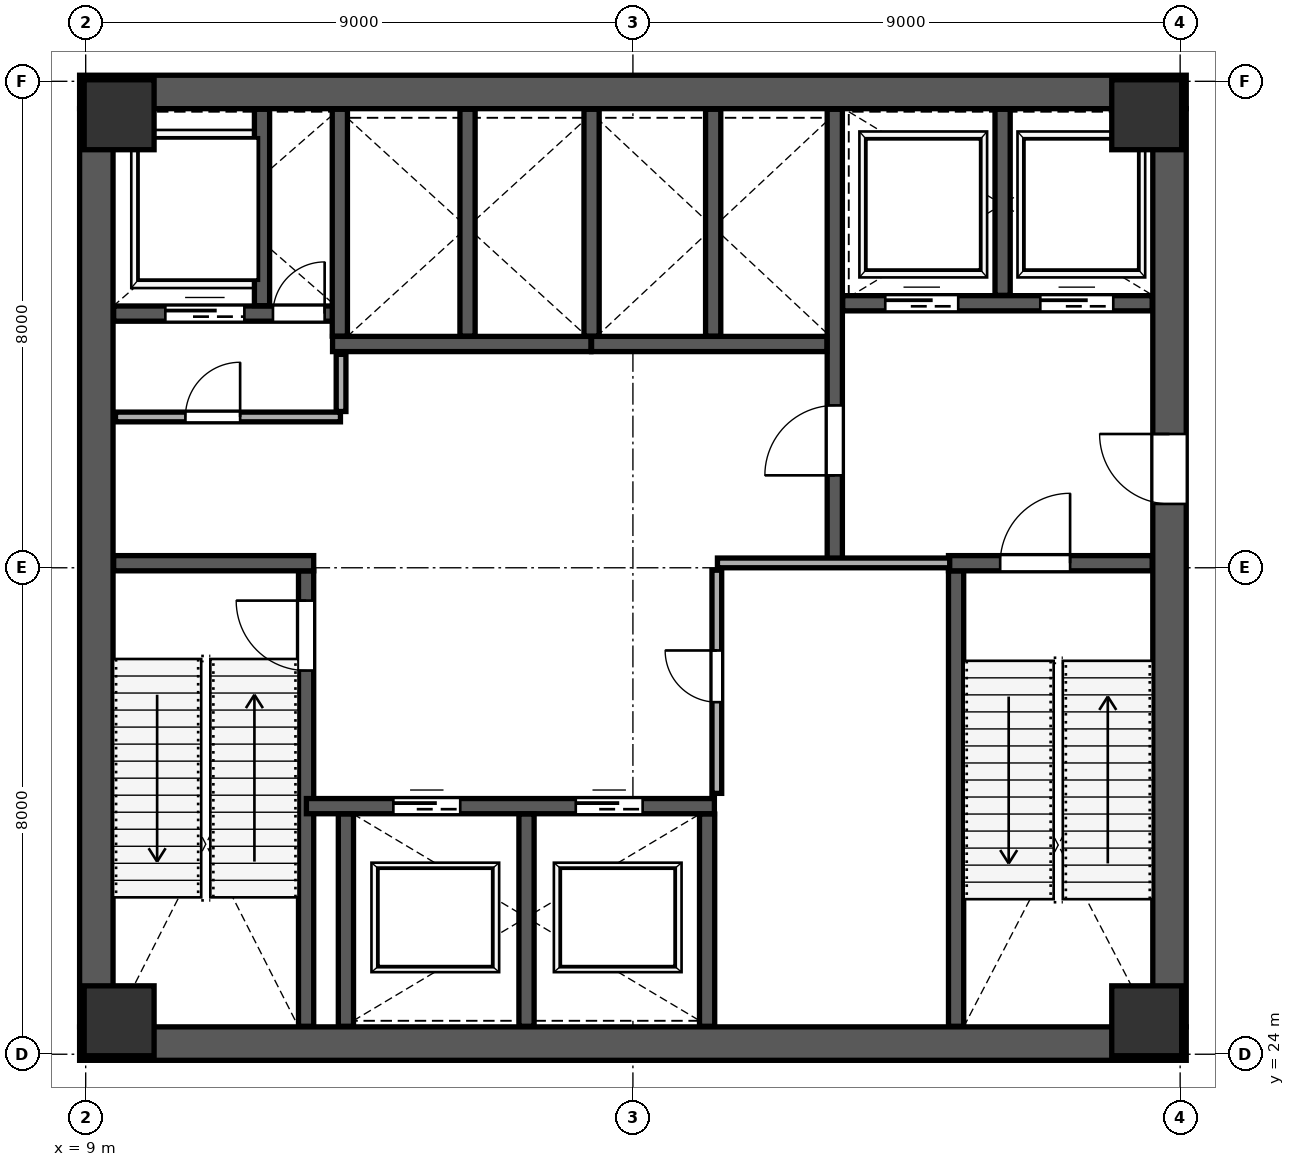
"""IFC4 building model, lengths in metres.
Left out: names, types, materials, properties, quantities, classifications, styles, units other than length and angle.
Written with IfcOpenShell. Run it as: python <this file> out.ifc"""

import sys

from ifc_helpers import new_model, si_unit, direction, frame, frame_2d, origin, origin_2d, place, context, subcontext, project, spatial, rectangle, extrude, source, transform, mapped, element, fill, save


model = new_model("IFC4")
c1 = context("Model", 3, precision=1e-05, world=origin(), true_north=direction((0.0, 1.0)))
c2 = subcontext(c1, "Body", "Model", "MODEL_VIEW")
j1 = project(units=[si_unit("LENGTHUNIT", "METRE"), si_unit("PLANEANGLEUNIT", "RADIAN")], contexts=[c1])
p1 = place(None, origin())
s1 = spatial("IfcSite", under=j1, at=p1, CompositionType="ELEMENT")
p2 = place(p1, origin())
s2 = spatial("IfcBuilding", under=s1, at=p2, CompositionType="ELEMENT")
p3 = place(p2, frame((0.0, 0.0, 116.8)))
s3 = spatial("IfcBuildingStorey", under=s2, at=p3, CompositionType="ELEMENT", Elevation=116.8)
m1 = source(origin(), c2, "Body", "SweptSolid", [
    extrude(rectangle(XDim=1.15, YDim=1.15, at=origin_2d()), origin(), (0.0, 0.0, 1.0), 5.398),
])
for number, where, z_axis, x_axis in (
    (1, (9.55, 24.55, 0.001), (0.0, 0.0, 1.0), (1.0, 0.0, 0.0)),
    (2, (26.45, 24.55, 0.001), (0.0, 0.0, 1.0), (1.0, 0.0, 0.0)),
    (3, (9.55, 39.45, 0.001), (0.0, 0.0, 1.0), (1.0, 0.0, 0.0)),
    (4, (26.45, 39.45, 0.001), (0.0, 0.0, 1.0), (1.0, 0.0, 0.0)),
):
    element("IfcColumn", number, at=place(p3, frame(where, z_axis=z_axis, x_axis=x_axis)), inside=s3, PredefinedType="COLUMN", context=c2, shape_type="MappedRepresentation", body=[
        mapped(m1, transform((0.0, 0.0, 0.0), scale=1.0)),
    ])
p4 = place(p3, frame((9.175, 24.45, 0.0), z_axis=(0.0, 0.0, 1.0), x_axis=(0.0, 1.0, 0.0)))
e5 = element("IfcWall", 5, at=p4, inside=s3, PredefinedType="SHEAR", context=c2, shape_type="SweptSolid", body=[
    extrude(rectangle(XDim=15.1, YDim=0.55, at=frame_2d((7.55, 0.0))), origin(), (0.0, 0.0, 1.0), 5.12),
])
p5 = place(p3, frame((26.825, 24.45, 0.0), z_axis=(0.0, 0.0, 1.0), x_axis=(0.0, 1.0, 0.0)))
e6 = element("IfcWall", 6, at=p5, inside=s3, PredefinedType="SHEAR", context=c2, shape_type="SweptSolid", body=[
    extrude(rectangle(XDim=15.1, YDim=0.55, at=frame_2d((7.55, 0.0))), origin(), (0.0, 0.0, 1.0), 5.12),
])
p6 = place(p5, frame((8.6, 0.0, 0.0)))
e7 = element("IfcOpeningElement", 7, at=p6, cuts=e6, PredefinedType="OPENING", context=c2, shape_type="SweptSolid", body=[
    extrude(rectangle(XDim=1.15, YDim=2.2, at=frame_2d((0.575, 1.1))), frame((0.0, 0.285, 0.0), z_axis=(0.0, -1.0, 0.0), x_axis=(1.0, 0.0, 0.0)), (0.0, 0.0, 1.0), 0.57),
])
for number, where, z_axis, x_axis in (
    (8, (8.9, 24.175, 0.0), (0.0, 0.0, 1.0), (1.0, 0.0, 0.0)),
    (9, (8.9, 39.825, 0.0), (0.0, 0.0, 1.0), (1.0, 0.0, 0.0)),
):
    element("IfcWall", number, at=place(p3, frame(where, z_axis=z_axis, x_axis=x_axis)), inside=s3, PredefinedType="SHEAR", context=c2, shape_type="SweptSolid", body=[
        extrude(rectangle(XDim=18.2, YDim=0.55, at=frame_2d((9.1, 0.0))), origin(), (0.0, 0.0, 1.0), 5.12),
    ])
p7 = place(p3, frame((12.625, 24.46, 0.0), z_axis=(0.0, 0.0, 1.0), x_axis=(0.0, 1.0, 0.0)))
e10 = element("IfcWall", 10, at=p7, inside=s3, PredefinedType="SHEAR", context=c2, shape_type="SweptSolid", body=[
    extrude(rectangle(XDim=7.49, YDim=0.25, at=frame_2d((3.745, 0.0))), origin(), (0.0, 0.0, 1.0), 5.12),
])
p8 = place(p7, frame((5.85, 0.0, 0.0)))
e11 = element("IfcOpeningElement", 11, at=p8, cuts=e10, PredefinedType="OPENING", context=c2, shape_type="SweptSolid", body=[
    extrude(rectangle(XDim=1.15, YDim=2.2, at=frame_2d((0.575, 1.1))), frame((0.0, 0.135, 0.0), z_axis=(0.0, -1.0, 0.0), x_axis=(1.0, 0.0, 0.0)), (0.0, 0.0, 1.0), 0.27),
])
p9 = place(p3, frame((9.46, 32.075, 0.0), z_axis=(0.0, 0.0, 1.0), x_axis=(1.0, 0.0, 0.0)))
e12 = element("IfcWall", 12, at=p9, inside=s3, PredefinedType="SHEAR", context=c2, shape_type="SweptSolid", body=[
    extrude(rectangle(XDim=3.29, YDim=0.25, at=frame_2d((1.645, 0.0))), origin(), (0.0, 0.0, 1.0), 5.12),
])
p10 = place(p3, frame((23.315, 24.46, 0.0), z_axis=(0.0, 0.0, 1.0), x_axis=(0.0, 1.0, 0.0)))
e13 = element("IfcWall", 13, at=p10, inside=s3, PredefinedType="SHEAR", context=c2, shape_type="SweptSolid", body=[
    extrude(rectangle(XDim=7.49, YDim=0.25, at=frame_2d((3.745, 0.0))), origin(), (0.0, 0.0, 1.0), 5.12),
])
p11 = place(p3, frame((23.19, 32.075, 0.0), z_axis=(0.0, 0.0, 1.0), x_axis=(1.0, 0.0, 0.0)))
e14 = element("IfcWall", 14, at=p11, inside=s3, PredefinedType="SHEAR", context=c2, shape_type="SweptSolid", body=[
    extrude(rectangle(XDim=3.35, YDim=0.25, at=frame_2d((1.675, 0.0))), origin(), (0.0, 0.0, 1.0), 5.12),
])
p12 = place(p11, frame((0.85, 0.0, 0.0)))
e15 = element("IfcOpeningElement", 15, at=p12, cuts=e14, PredefinedType="OPENING", context=c2, shape_type="SweptSolid", body=[
    extrude(rectangle(XDim=1.15, YDim=2.2, at=frame_2d((0.575, 1.1))), frame((0.0, 0.135, 0.0), z_axis=(0.0, -1.0, 0.0), x_axis=(1.0, 0.0, 0.0)), (0.0, 0.0, 1.0), 0.27),
])
p13 = place(p3, frame((21.32, 32.12, 0.0), z_axis=(0.0, 0.0, 1.0), x_axis=(0.0, 1.0, 0.0)))
e16 = element("IfcWall", 16, at=p13, inside=s3, PredefinedType="SHEAR", context=c2, shape_type="SweptSolid", body=[
    extrude(rectangle(XDim=7.42, YDim=0.25, at=frame_2d((3.71, 0.0))), origin(), (0.0, 0.0, 1.0), 5.12),
])
p14 = place(p13, frame((1.4, 0.0, 0.0)))
e17 = element("IfcOpeningElement", 17, at=p14, cuts=e16, PredefinedType="OPENING", context=c2, shape_type="SweptSolid", body=[
    extrude(rectangle(XDim=1.15, YDim=2.2, at=frame_2d((0.575, 1.1))), frame((0.0, 0.135, 0.0), z_axis=(0.0, -1.0, 0.0), x_axis=(1.0, 0.0, 0.0)), (0.0, 0.0, 1.0), 0.27),
])
p15 = place(p3, frame((9.46, 36.18, 0.0), z_axis=(0.0, 0.0, 1.0), x_axis=(1.0, 0.0, 0.0)))
e18 = element("IfcWall", 18, at=p15, inside=s3, PredefinedType="SHEAR", context=c2, shape_type="SweptSolid", body=[
    extrude(rectangle(XDim=3.79, YDim=0.25, at=frame_2d((1.895, 0.0))), origin(), (0.0, 0.0, 1.0), 5.12),
])
p16 = place(p15, frame((2.62, 0.0, 0.0)))
e19 = element("IfcOpeningElement", 19, at=p16, cuts=e18, PredefinedType="OPENING", context=c2, shape_type="SweptSolid", body=[
    extrude(rectangle(XDim=0.85, YDim=2.1, at=frame_2d((0.425, 1.05))), frame((0.0, 0.135, 0.0), z_axis=(0.0, -1.0, 0.0), x_axis=(1.0, 0.0, 0.0)), (0.0, 0.0, 1.0), 0.27),
])
p17 = place(p15, frame((0.85, 0.0, 0.0)))
e20 = element("IfcOpeningElement", 20, at=p17, cuts=e18, PredefinedType="OPENING", context=c2, shape_type="SweptSolid", body=[
    extrude(rectangle(XDim=1.3, YDim=2.25, at=frame_2d((0.65, 1.125))), frame((0.0, 0.135, 0.0), z_axis=(0.0, -1.0, 0.0), x_axis=(1.0, 0.0, 0.0)), (0.0, 0.0, 1.0), 0.27),
])
p18 = place(p3, frame((11.9, 36.31, 0.0), z_axis=(0.0, 0.0, 1.0), x_axis=(0.0, 1.0, 0.0)))
e21 = element("IfcWall", 21, at=p18, inside=s3, PredefinedType="SHEAR", context=c2, shape_type="SweptSolid", body=[
    extrude(rectangle(XDim=3.23, YDim=0.25, at=frame_2d((1.615, 0.0))), origin(), (0.0, 0.0, 1.0), 5.12),
])
p19 = place(p3, frame((21.45, 36.35, 0.0), z_axis=(0.0, 0.0, 1.0), x_axis=(1.0, 0.0, 0.0)))
e22 = element("IfcWall", 22, at=p19, inside=s3, PredefinedType="SHEAR", context=c2, shape_type="SweptSolid", body=[
    extrude(rectangle(XDim=5.09, YDim=0.25, at=frame_2d((2.545, 0.0))), origin(), (0.0, 0.0, 1.0), 5.12),
])
p20 = place(p19, frame((0.7, 0.0, 0.0)))
e23 = element("IfcOpeningElement", 23, at=p20, cuts=e22, PredefinedType="OPENING", context=c2, shape_type="SweptSolid", body=[
    extrude(rectangle(XDim=1.2, YDim=2.2, at=frame_2d((0.6, 1.1))), frame((0.0, 0.135, 0.0), z_axis=(0.0, -1.0, 0.0), x_axis=(1.0, 0.0, 0.0)), (0.0, 0.0, 1.0), 0.27),
])
p21 = place(p19, frame((3.25, 0.0, 0.0)))
e24 = element("IfcOpeningElement", 24, at=p21, cuts=e22, PredefinedType="OPENING", context=c2, shape_type="SweptSolid", body=[
    extrude(rectangle(XDim=1.2, YDim=2.2, at=frame_2d((0.6, 1.1))), frame((0.0, 0.135, 0.0), z_axis=(0.0, -1.0, 0.0), x_axis=(1.0, 0.0, 0.0)), (0.0, 0.0, 1.0), 0.27),
])
p22 = place(p3, frame((24.08, 36.48, 0.0), z_axis=(0.0, 0.0, 1.0), x_axis=(0.0, 1.0, 0.0)))
e25 = element("IfcWall", 25, at=p22, inside=s3, PredefinedType="SHEAR", context=c2, shape_type="SweptSolid", body=[
    extrude(rectangle(XDim=3.06, YDim=0.25, at=frame_2d((1.53, 0.0))), origin(), (0.0, 0.0, 1.0), 5.12),
])
p23 = place(p3, frame((12.63, 28.08, 0.0), z_axis=(0.0, 0.0, 1.0), x_axis=(1.0, 0.0, 0.0)))
e26 = element("IfcWall", 26, at=p23, inside=s3, PredefinedType="SHEAR", context=c2, shape_type="SweptSolid", body=[
    extrude(rectangle(XDim=6.71, YDim=0.25, at=frame_2d((3.355, 0.0))), origin(), (0.0, 0.0, 1.0), 5.12),
])
p24 = place(p23, frame((1.43, 0.0, 0.0)))
e27 = element("IfcOpeningElement", 27, at=p24, cuts=e26, PredefinedType="OPENING", context=c2, shape_type="SweptSolid", body=[
    extrude(rectangle(XDim=1.1, YDim=2.2, at=frame_2d((0.55, 1.1))), frame((0.0, 0.135, 0.0), z_axis=(0.0, -1.0, 0.0), x_axis=(1.0, 0.0, 0.0)), (0.0, 0.0, 1.0), 0.27),
])
p25 = place(p23, frame((4.43, 0.0, 0.0)))
e28 = element("IfcOpeningElement", 28, at=p25, cuts=e26, PredefinedType="OPENING", context=c2, shape_type="SweptSolid", body=[
    extrude(rectangle(XDim=1.1, YDim=2.2, at=frame_2d((0.55, 1.1))), frame((0.0, 0.135, 0.0), z_axis=(0.0, -1.0, 0.0), x_axis=(1.0, 0.0, 0.0)), (0.0, 0.0, 1.0), 0.27),
])
for number, where, z_axis, x_axis in (
    (29, (13.28, 24.46, 0.0), (0.0, 0.0, 1.0), (0.0, 1.0, 0.0)),
    (30, (16.25, 24.46, 0.0), (0.0, 0.0, 1.0), (0.0, 1.0, 0.0)),
    (31, (19.22, 24.46, 0.0), (0.0, 0.0, 1.0), (0.0, 1.0, 0.0)),
):
    element("IfcWall", number, at=place(p3, frame(where, z_axis=z_axis, x_axis=x_axis)), inside=s3, PredefinedType="SHEAR", context=c2, shape_type="SweptSolid", body=[
        extrude(rectangle(XDim=3.49, YDim=0.25, at=frame_2d((1.745, 0.0))), origin(), (0.0, 0.0, 1.0), 5.12),
    ])
p26 = place(p3, frame((13.06, 35.68, 0.0), z_axis=(0.0, 0.0, 1.0), x_axis=(1.0, 0.0, 0.0)))
e32 = element("IfcWall", 32, at=p26, inside=s3, PredefinedType="SHEAR", context=c2, shape_type="SweptSolid", body=[
    extrude(rectangle(XDim=4.25, YDim=0.25, at=frame_2d((2.125, 0.0))), origin(), (0.0, 0.0, 1.0), 5.12),
])
for number, where, z_axis, x_axis in (
    (33, (13.18, 35.81, 0.0), (0.0, 0.0, 1.0), (0.0, 1.0, 0.0)),
    (34, (15.28, 35.81, 0.0), (0.0, 0.0, 1.0), (0.0, 1.0, 0.0)),
):
    element("IfcWall", number, at=place(p3, frame(where, z_axis=z_axis, x_axis=x_axis)), inside=s3, PredefinedType="SHEAR", context=c2, shape_type="SweptSolid", body=[
        extrude(rectangle(XDim=3.73, YDim=0.25, at=frame_2d((1.865, 0.0))), origin(), (0.0, 0.0, 1.0), 5.12),
    ])
p27 = place(p3, frame((17.32, 35.68, 0.0), z_axis=(0.0, 0.0, 1.0), x_axis=(1.0, 0.0, 0.0)))
e35 = element("IfcWall", 35, at=p27, inside=s3, PredefinedType="SHEAR", context=c2, shape_type="SweptSolid", body=[
    extrude(rectangle(XDim=3.87, YDim=0.25, at=frame_2d((1.935, 0.0))), origin(), (0.0, 0.0, 1.0), 5.12),
])
for number, where, z_axis, x_axis in (
    (36, (17.32, 35.81, 0.0), (0.0, 0.0, 1.0), (0.0, 1.0, 0.0)),
    (37, (19.32, 35.81, 0.0), (0.0, 0.0, 1.0), (0.0, 1.0, 0.0)),
):
    element("IfcWall", number, at=place(p3, frame(where, z_axis=z_axis, x_axis=x_axis)), inside=s3, PredefinedType="SHEAR", context=c2, shape_type="SweptSolid", body=[
        extrude(rectangle(XDim=3.73, YDim=0.25, at=frame_2d((1.865, 0.0))), origin(), (0.0, 0.0, 1.0), 5.12),
    ])
p28 = place(p3, frame((9.49, 34.48, 0.0), z_axis=(0.0, 0.0, 1.0), x_axis=(1.0, 0.0, 0.0)))
e38 = element("IfcWall", 38, at=p28, inside=s3, PredefinedType="PARTITIONING", context=c2, shape_type="SweptSolid", body=[
    extrude(rectangle(XDim=3.7, YDim=0.16, at=frame_2d((1.85, 0.0))), origin(), (0.0, 0.0, 1.0), 5.12),
])
p29 = place(p28, frame((1.15, 0.0, 0.0)))
e39 = element("IfcOpeningElement", 39, at=p29, cuts=e38, PredefinedType="OPENING", context=c2, shape_type="SweptSolid", body=[
    extrude(rectangle(XDim=0.9, YDim=2.15, at=frame_2d((0.45, 1.075))), frame((0.0, 0.09, 0.0), z_axis=(0.0, -1.0, 0.0), x_axis=(1.0, 0.0, 0.0)), (0.0, 0.0, 1.0), 0.18),
])
p30 = place(p3, frame((13.2, 34.57, 0.0), z_axis=(0.0, 0.0, 1.0), x_axis=(0.0, 1.0, 0.0)))
e40 = element("IfcWall", 40, at=p30, inside=s3, PredefinedType="PARTITIONING", context=c2, shape_type="SweptSolid", body=[
    extrude(rectangle(XDim=0.94, YDim=0.16, at=frame_2d((0.47, 0.0))), origin(), (0.0, 0.0, 1.0), 5.12),
])
p31 = place(p3, frame((19.39, 32.08, 0.0), z_axis=(0.0, 0.0, 1.0), x_axis=(1.0, 0.0, 0.0)))
e41 = element("IfcWall", 41, at=p31, inside=s3, PredefinedType="PARTITIONING", context=c2, shape_type="SweptSolid", body=[
    extrude(rectangle(XDim=3.82, YDim=0.16, at=frame_2d((1.91, 0.0))), origin(), (0.0, 0.0, 1.0), 5.12),
])
p32 = place(p3, frame((19.38, 28.29, 0.0), z_axis=(0.0, 0.0, 1.0), x_axis=(0.0, 1.0, 0.0)))
e42 = element("IfcWall", 42, at=p32, inside=s3, PredefinedType="PARTITIONING", context=c2, shape_type="SweptSolid", body=[
    extrude(rectangle(XDim=3.67, YDim=0.16, at=frame_2d((1.835, 0.0))), origin(), (0.0, 0.0, 1.0), 5.12),
])
p33 = place(p32, frame((1.5, 0.0, 0.0)))
e43 = element("IfcOpeningElement", 43, at=p33, cuts=e42, PredefinedType="OPENING", context=c2, shape_type="SweptSolid", body=[
    extrude(rectangle(XDim=0.85, YDim=2.1, at=frame_2d((0.425, 1.05))), frame((0.0, 0.09, 0.0), z_axis=(0.0, -1.0, 0.0), x_axis=(1.0, 0.0, 0.0)), (0.0, 0.0, 1.0), 0.18),
])
p34 = place(p3, frame((8.053, 47.616, 0.0), z_axis=(0.0, 0.0, 1.0), x_axis=(0.953717706363, -0.300703402989, 0.0)))
e44 = element("IfcWall", 44, at=p34, inside=s3, PredefinedType="PARTITIONING", context=c2, shape_type="SweptSolid", body=[
    extrude(rectangle(XDim=27.14, YDim=0.1, at=frame_2d((13.57, 0.0))), origin(), (0.0, 0.0, 1.0), 5.12),
])
p35 = place(p34, frame((0.91, 0.0, 0.0)))
e45 = element("IfcOpeningElement", 45, at=p35, cuts=e44, PredefinedType="OPENING", context=c2, shape_type="SweptSolid", body=[
    extrude(rectangle(XDim=0.95, YDim=2.15, at=frame_2d((0.475, 1.075))), frame((0.0, 0.06, 0.0), z_axis=(0.0, -1.0, 0.0), x_axis=(1.0, 0.0, 0.0)), (0.0, 0.0, 1.0), 0.12),
])
p36 = place(p3, frame((25.294, 11.909, 0.0), z_axis=(0.0, 0.0, 1.0), x_axis=(0.300707324156, 0.953716470026, 0.0)))
e46 = element("IfcWall", 46, at=p36, inside=s3, PredefinedType="PARTITIONING", context=c2, shape_type="SweptSolid", body=[
    extrude(rectangle(XDim=12.18, YDim=0.16, at=frame_2d((6.09, 0.0))), origin(), (0.0, 0.0, 1.0), 5.12),
])
m2 = source(origin(), c2, "Body", "SweptSolid", [
    extrude(rectangle(XDim=1.15, YDim=2.2, at=frame_2d((0.575, 1.1))), frame((0.0, 0.025, 0.0), z_axis=(0.0, -1.0, 0.0), x_axis=(1.0, 0.0, 0.0)), (0.0, 0.0, 1.0), 0.05),
])
p37 = place(p8, origin())
e47 = element("IfcDoor", 47, at=p37, inside=s3, OperationType="SINGLE_SWING_RIGHT", PredefinedType="DOOR", context=c2, shape_type="MappedRepresentation", body=[
    mapped(m2, transform((0.0, 0.0, 0.0), scale=1.0)),
])
fill(e11, e47)
m3 = source(origin(), c2, "Body", "SweptSolid", [
    extrude(rectangle(XDim=1.15, YDim=2.2, at=frame_2d((0.575, 1.1))), frame((0.0, 0.025, 0.0), z_axis=(0.0, -1.0, 0.0), x_axis=(1.0, 0.0, 0.0)), (0.0, 0.0, 1.0), 0.05),
])
p38 = place(p14, origin())
e48 = element("IfcDoor", 48, at=p38, inside=s3, OperationType="SINGLE_SWING_LEFT", PredefinedType="DOOR", context=c2, shape_type="MappedRepresentation", body=[
    mapped(m3, transform((0.0, 0.0, 0.0), scale=1.0)),
])
fill(e17, e48)
p39 = place(p12, origin())
e49 = element("IfcDoor", 49, at=p39, inside=s3, OperationType="SINGLE_SWING_RIGHT", PredefinedType="DOOR", context=c2, shape_type="MappedRepresentation", body=[
    mapped(m2, transform((0.0, 0.0, 0.0), scale=1.0)),
])
fill(e15, e49)
p40 = place(p6, origin())
e50 = element("IfcDoor", 50, at=p40, inside=s3, OperationType="SINGLE_SWING_RIGHT", PredefinedType="DOOR", context=c2, shape_type="MappedRepresentation", body=[
    mapped(m3, transform((0.0, 0.0, 0.0), scale=1.0)),
])
fill(e7, e50)
m4 = source(origin(), c2, "Body", "SweptSolid", [
    extrude(rectangle(XDim=0.85, YDim=2.1, at=frame_2d((0.425, 1.05))), frame((0.0, 0.025, 0.0), z_axis=(0.0, -1.0, 0.0), x_axis=(1.0, 0.0, 0.0)), (0.0, 0.0, 1.0), 0.05),
])
p41 = place(p16, origin())
e51 = element("IfcDoor", 51, at=p41, inside=s3, OperationType="SINGLE_SWING_RIGHT", PredefinedType="DOOR", context=c2, shape_type="MappedRepresentation", body=[
    mapped(m4, transform((0.0, 0.0, 0.0), scale=1.0)),
])
fill(e19, e51)
m5 = source(origin(), c2, "Body", "SweptSolid", [
    extrude(rectangle(XDim=1.1, YDim=2.2, at=frame_2d((0.55, 1.1))), frame((0.0, 0.025, 0.0), z_axis=(0.0, -1.0, 0.0), x_axis=(1.0, 0.0, 0.0)), (0.0, 0.0, 1.0), 0.05),
])
p42 = place(p24, origin())
e52 = element("IfcDoor", 52, at=p42, inside=s3, OperationType="SLIDING_TO_LEFT", PredefinedType="DOOR", context=c2, shape_type="MappedRepresentation", body=[
    mapped(m5, transform((0.0, 0.0, 0.0), scale=1.0)),
])
fill(e27, e52)
p43 = place(p25, origin())
e53 = element("IfcDoor", 53, at=p43, inside=s3, OperationType="SLIDING_TO_RIGHT", PredefinedType="DOOR", context=c2, shape_type="MappedRepresentation", body=[
    mapped(m5, transform((0.0, 0.0, 0.0), scale=1.0)),
])
fill(e28, e53)
m6 = source(origin(), c2, "Body", "SweptSolid", [
    extrude(rectangle(XDim=1.2, YDim=2.2, at=frame_2d((0.6, 1.1))), frame((0.0, 0.025, 0.0), z_axis=(0.0, -1.0, 0.0), x_axis=(1.0, 0.0, 0.0)), (0.0, 0.0, 1.0), 0.05),
])
p44 = place(p20, origin())
e54 = element("IfcDoor", 54, at=p44, inside=s3, OperationType="SLIDING_TO_LEFT", PredefinedType="DOOR", context=c2, shape_type="MappedRepresentation", body=[
    mapped(m6, transform((0.0, 0.0, 0.0), scale=1.0)),
])
fill(e23, e54)
p45 = place(p21, origin())
e55 = element("IfcDoor", 55, at=p45, inside=s3, OperationType="SLIDING_TO_RIGHT", PredefinedType="DOOR", context=c2, shape_type="MappedRepresentation", body=[
    mapped(m6, transform((0.0, 0.0, 0.0), scale=1.0)),
])
fill(e24, e55)
m7 = source(origin(), c2, "Body", "SweptSolid", [
    extrude(rectangle(XDim=1.3, YDim=2.25, at=frame_2d((0.65, 1.125))), frame((0.0, 0.025, 0.0), z_axis=(0.0, -1.0, 0.0), x_axis=(1.0, 0.0, 0.0)), (0.0, 0.0, 1.0), 0.05),
])
p46 = place(p17, origin())
e56 = element("IfcDoor", 56, at=p46, inside=s3, OperationType="SLIDING_TO_LEFT", PredefinedType="DOOR", context=c2, shape_type="MappedRepresentation", body=[
    mapped(m7, transform((0.0, 0.0, 0.0), scale=1.0)),
])
fill(e20, e56)
m8 = source(origin(), c2, "Body", "SweptSolid", [
    extrude(rectangle(XDim=0.9, YDim=2.15, at=frame_2d((0.45, 1.075))), frame((0.0, 0.025, 0.0), z_axis=(0.0, -1.0, 0.0), x_axis=(1.0, 0.0, 0.0)), (0.0, 0.0, 1.0), 0.05),
])
p47 = place(p29, origin())
e57 = element("IfcDoor", 57, at=p47, inside=s3, OperationType="SINGLE_SWING_RIGHT", PredefinedType="DOOR", context=c2, shape_type="MappedRepresentation", body=[
    mapped(m8, transform((0.0, 0.0, 0.0), scale=1.0)),
])
fill(e39, e57)
p48 = place(p33, origin())
e58 = element("IfcDoor", 58, at=p48, inside=s3, OperationType="SINGLE_SWING_RIGHT", PredefinedType="DOOR", context=c2, shape_type="MappedRepresentation", body=[
    mapped(m4, transform((0.0, 0.0, 0.0), scale=1.0)),
])
fill(e43, e58)
save(model, sys.argv[1])
